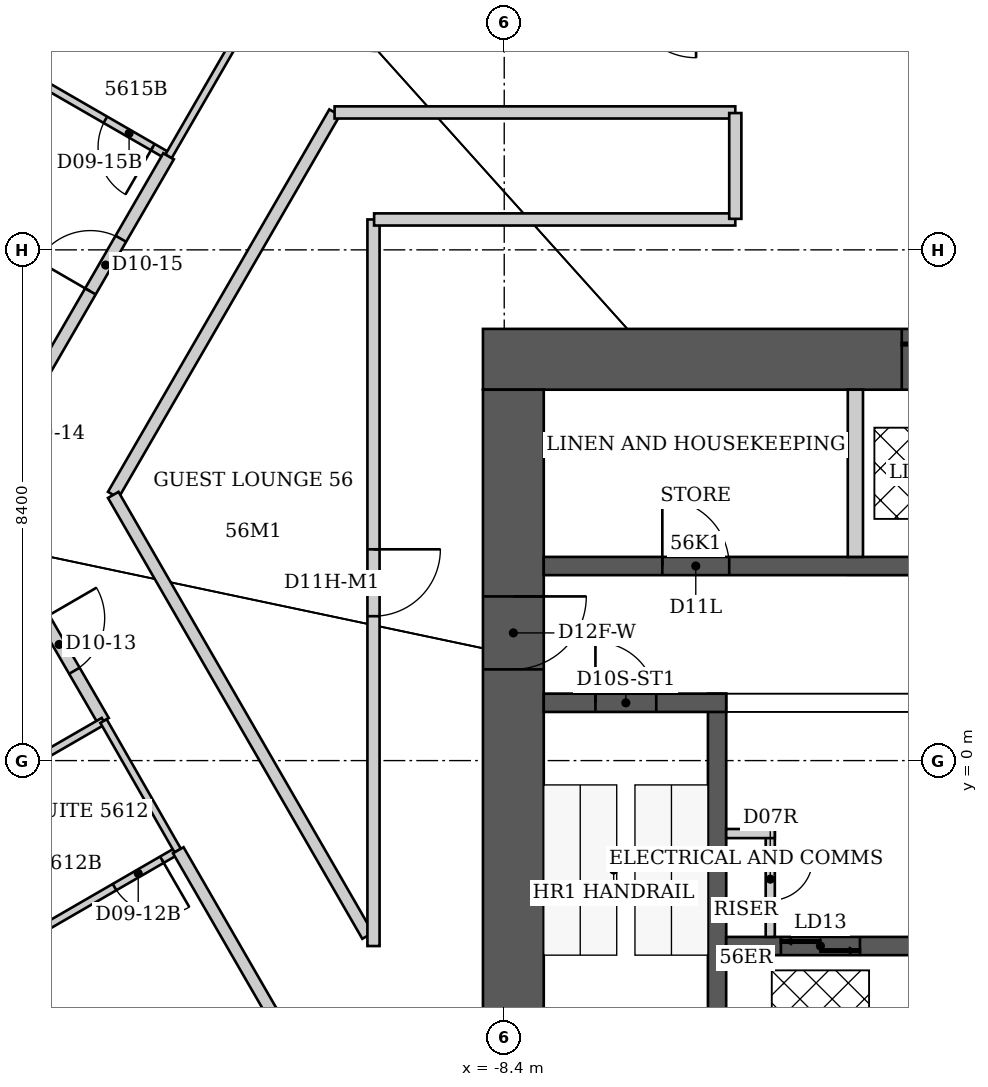
"""IFC4 building model, lengths in metres.
Left out: names, types, materials, properties, quantities, classifications, styles, units other than length and angle.
Written with IfcOpenShell. Run it as: python <this file> out.ifc"""

import sys

from ifc_helpers import new_model, si_unit, direction, frame, frame_2d, origin, place, context, subcontext, project, spatial, rectangle, extrude, element, fill, save


model = new_model("IFC4")
c1 = context("Model", 3, precision=1e-05, world=origin(), true_north=direction((0.0, 1.0)))
c2 = subcontext(c1, "Body", "Model", "MODEL_VIEW")
j1 = project(units=[si_unit("LENGTHUNIT", "METRE"), si_unit("PLANEANGLEUNIT", "RADIAN")], contexts=[c1])
p1 = place(None, origin())
s1 = spatial("IfcSite", under=j1, at=p1, CompositionType="ELEMENT")
p2 = place(p1, origin())
s2 = spatial("IfcBuilding", under=s1, at=p2, CompositionType="ELEMENT")
p3 = place(p2, frame((0.0, 0.0, 225.0)))
s3 = spatial("IfcBuildingStorey", under=s2, at=p3, CompositionType="ELEMENT", Elevation=225.0)
p4 = place(p3, frame((-8.75, 6.6, 0.0), z_axis=(0.0, 0.0, 1.0), x_axis=(1.0, 0.0, 0.0)))
e1 = element("IfcWall", 1, at=p4, inside=s3, PredefinedType="SHEAR", context=c2, shape_type="SweptSolid", body=[
    extrude(rectangle(XDim=17.5, YDim=1.0, at=frame_2d((8.75, 0.0))), origin(), (0.0, 0.0, 1.0), 3.8),
])
p5 = place(p4, frame((6.887, 0.0, 0.0)))
e2 = element("IfcOpeningElement", 2, at=p5, cuts=e1, PredefinedType="OPENING", context=c2, shape_type="SweptSolid", body=[
    extrude(rectangle(XDim=1.1, YDim=2.1, at=frame_2d((0.55, 1.05))), frame((0.0, 0.5, 0.0), z_axis=(0.0, -1.0, 0.0), x_axis=(1.0, 0.0, 0.0)), (0.0, 0.0, 1.0), 1.0),
])
p6 = place(p4, frame((9.512, 0.0, 0.0)))
e3 = element("IfcOpeningElement", 3, at=p6, cuts=e1, PredefinedType="OPENING", context=c2, shape_type="SweptSolid", body=[
    extrude(rectangle(XDim=1.1, YDim=2.1, at=frame_2d((0.55, 1.05))), frame((0.0, 0.5, 0.0), z_axis=(0.0, -1.0, 0.0), x_axis=(1.0, 0.0, 0.0)), (0.0, 0.0, 1.0), 1.0),
])
p7 = place(p4, frame((12.137, 0.0, 0.0)))
e4 = element("IfcOpeningElement", 4, at=p7, cuts=e1, PredefinedType="OPENING", context=c2, shape_type="SweptSolid", body=[
    extrude(rectangle(XDim=1.1, YDim=2.1, at=frame_2d((0.55, 1.05))), frame((0.0, 0.5, 0.0), z_axis=(0.0, -1.0, 0.0), x_axis=(1.0, 0.0, 0.0)), (0.0, 0.0, 1.0), 1.0),
])
p8 = place(p4, frame((14.762, 0.0, 0.0)))
e5 = element("IfcOpeningElement", 5, at=p8, cuts=e1, PredefinedType="OPENING", context=c2, shape_type="SweptSolid", body=[
    extrude(rectangle(XDim=1.1, YDim=2.1, at=frame_2d((0.55, 1.05))), frame((0.0, 0.5, 0.0), z_axis=(0.0, -1.0, 0.0), x_axis=(1.0, 0.0, 0.0)), (0.0, 0.0, 1.0), 1.0),
])
p9 = place(p3, frame((-8.25, -6.1, 0.0), z_axis=(0.0, 0.0, 1.0), x_axis=(0.0, 1.0, 0.0)))
e6 = element("IfcWall", 6, at=p9, inside=s3, PredefinedType="SHEAR", context=c2, shape_type="SweptSolid", body=[
    extrude(rectangle(XDim=12.2, YDim=1.0, at=frame_2d((6.1, 0.0))), origin(), (0.0, 0.0, 1.0), 3.8),
])
p10 = place(p9, frame((7.6, 0.0, 0.0)))
e7 = element("IfcOpeningElement", 7, at=p10, cuts=e6, PredefinedType="OPENING", context=c2, shape_type="SweptSolid", body=[
    extrude(rectangle(XDim=1.2, YDim=2.2, at=frame_2d((0.6, 1.1))), frame((0.0, 0.5, 0.0), z_axis=(0.0, -1.0, 0.0), x_axis=(1.0, 0.0, 0.0)), (0.0, 0.0, 1.0), 1.0),
])
p11 = place(p3, frame((-4.9, -6.1, 0.0), z_axis=(0.0, 0.0, 1.0), x_axis=(0.0, 1.0, 0.0)))
e8 = element("IfcWall", 8, at=p11, inside=s3, PredefinedType="SHEAR", context=c2, shape_type="SweptSolid", body=[
    extrude(rectangle(XDim=7.2, YDim=0.3, at=frame_2d((3.6, 0.0))), origin(), (0.0, 0.0, 1.0), 3.8),
])
p12 = place(p3, frame((-7.75, 0.95, 0.0), z_axis=(0.0, 0.0, 1.0), x_axis=(1.0, 0.0, 0.0)))
e9 = element("IfcWall", 9, at=p12, inside=s3, PredefinedType="SHEAR", context=c2, shape_type="SweptSolid", body=[
    extrude(rectangle(XDim=3.0, YDim=0.3, at=frame_2d((1.5, 0.0))), origin(), (0.0, 0.0, 1.0), 3.8),
])
p13 = place(p12, frame((0.85, 0.0, 0.0)))
e10 = element("IfcOpeningElement", 10, at=p13, cuts=e9, PredefinedType="OPENING", context=c2, shape_type="SweptSolid", body=[
    extrude(rectangle(XDim=1.0, YDim=2.2, at=frame_2d((0.5, 1.1))), frame((0.0, 0.15, 0.0), z_axis=(0.0, -1.0, 0.0), x_axis=(1.0, 0.0, 0.0)), (0.0, 0.0, 1.0), 0.3),
])
p14 = place(p3, frame((-4.75, -3.05, 0.0), z_axis=(0.0, 0.0, 1.0), x_axis=(1.0, 0.0, 0.0)))
e11 = element("IfcWall", 11, at=p14, inside=s3, PredefinedType="SHEAR", context=c2, shape_type="SweptSolid", body=[
    extrude(rectangle(XDim=3.1, YDim=0.3, at=frame_2d((1.55, 0.0))), origin(), (0.0, 0.0, 1.0), 3.8),
])
p15 = place(p14, frame((0.9, 0.0, 0.0)))
e12 = element("IfcOpeningElement", 12, at=p15, cuts=e11, PredefinedType="OPENING", context=c2, shape_type="SweptSolid", body=[
    extrude(rectangle(XDim=1.3, YDim=2.1, at=frame_2d((0.65, 1.05))), frame((0.0, 0.15, 0.0), z_axis=(0.0, -1.0, 0.0), x_axis=(1.0, 0.0, 0.0)), (0.0, 0.0, 1.0), 0.3),
])
p16 = place(p3, frame((-7.75, 3.2, 0.0), z_axis=(0.0, 0.0, 1.0), x_axis=(1.0, 0.0, 0.0)))
e13 = element("IfcWall", 13, at=p16, inside=s3, PredefinedType="SHEAR", context=c2, shape_type="SweptSolid", body=[
    extrude(rectangle(XDim=15.5, YDim=0.3, at=frame_2d((7.75, 0.0))), origin(), (0.0, 0.0, 1.0), 3.8),
])
p17 = place(p16, frame((1.95, 0.0, 0.0)))
e14 = element("IfcOpeningElement", 14, at=p17, cuts=e13, PredefinedType="OPENING", context=c2, shape_type="SweptSolid", body=[
    extrude(rectangle(XDim=1.1, YDim=2.2, at=frame_2d((0.55, 1.1))), frame((0.0, 0.15, 0.0), z_axis=(0.0, -1.0, 0.0), x_axis=(1.0, 0.0, 0.0)), (0.0, 0.0, 1.0), 0.3),
])
p18 = place(p3, frame((-2.625, 3.35, 0.0), z_axis=(0.0, 0.0, 1.0), x_axis=(0.0, 1.0, 0.0)))
e15 = element("IfcWall", 15, at=p18, inside=s3, PredefinedType="PARTITIONING", context=c2, shape_type="SweptSolid", body=[
    extrude(rectangle(XDim=2.75, YDim=0.25, at=frame_2d((1.375, 0.0))), origin(), (0.0, 0.0, 1.0), 3.8),
])
p19 = place(p3, frame((-16.45, 3.17, 0.0), z_axis=(0.0, 0.0, 1.0), x_axis=(0.501293994647, -0.865277025542, 0.0)))
e16 = element("IfcWall", 16, at=p19, inside=s3, PredefinedType="PARTITIONING", context=c2, shape_type="SweptSolid", body=[
    extrude(rectangle(XDim=2.912, YDim=0.2, at=frame_2d((1.456, 0.0))), origin(), (0.0, 0.0, 1.0), 3.64),
])
p20 = place(p19, frame((0.956, 0.0, 0.0)))
e17 = element("IfcOpeningElement", 17, at=p20, cuts=e16, PredefinedType="OPENING", context=c2, shape_type="SweptSolid", body=[
    extrude(rectangle(XDim=1.0, YDim=2.13, at=frame_2d((0.5, 1.065))), frame((0.0, 0.1, 0.0), z_axis=(0.0, -1.0, 0.0), x_axis=(1.0, 0.0, 0.0)), (0.0, 0.0, 1.0), 0.2),
])
p21 = place(p3, frame((-16.19, 11.25, 0.0), z_axis=(0.0, 0.0, 1.0), x_axis=(0.866114241029, -0.499846097802, 0.0)))
e18 = element("IfcWall", 18, at=p21, inside=s3, PredefinedType="PARTITIONING", context=c2, shape_type="SweptSolid", body=[
    extrude(rectangle(XDim=2.621, YDim=0.12, at=frame_2d((1.311, 0.0))), origin(), (0.0, 0.0, 1.0), 3.64),
])
p22 = place(p21, frame((1.421, 0.0, 0.0)))
e19 = element("IfcOpeningElement", 19, at=p22, cuts=e18, PredefinedType="OPENING", context=c2, shape_type="SweptSolid", body=[
    extrude(rectangle(XDim=0.9, YDim=2.03, at=frame_2d((0.45, 1.015))), frame((0.0, 0.06, 0.0), z_axis=(0.0, -1.0, 0.0), x_axis=(1.0, 0.0, 0.0)), (0.0, 0.0, 1.0), 0.12),
])
p23 = place(p3, frame((-16.119, -0.002, 0.0), z_axis=(0.0, 0.0, 1.0), x_axis=(0.865998449813, 0.500046682742, 0.0)))
e20 = element("IfcWall", 20, at=p23, inside=s3, PredefinedType="PARTITIONING", context=c2, shape_type="SweptSolid", body=[
    extrude(rectangle(XDim=1.304, YDim=0.12, at=frame_2d((0.652, 0.0))), origin(), (0.0, 0.0, 1.0), 3.64),
])
p24 = place(p3, frame((-16.07, -2.81, 0.0), z_axis=(0.0, 0.0, 1.0), x_axis=(0.865675724273, 0.500605174168, 0.0)))
e21 = element("IfcWall", 21, at=p24, inside=s3, PredefinedType="PARTITIONING", context=c2, shape_type="SweptSolid", body=[
    extrude(rectangle(XDim=2.657, YDim=0.12, at=frame_2d((1.329, 0.0))), origin(), (0.0, 0.0, 1.0), 3.023),
])
p25 = place(p24, frame((1.457, 0.0, 0.0)))
e22 = element("IfcOpeningElement", 22, at=p25, cuts=e21, PredefinedType="OPENING", context=c2, shape_type="SweptSolid", body=[
    extrude(rectangle(XDim=0.9, YDim=2.03, at=frame_2d((0.45, 1.015))), frame((0.0, 0.06, 0.0), z_axis=(0.0, -1.0, 0.0), x_axis=(1.0, 0.0, 0.0)), (0.0, 0.0, 1.0), 0.12),
])
p26 = place(p3, frame((-15.99, 6.36, 0.0), z_axis=(0.0, 0.0, 1.0), x_axis=(0.500589371231, 0.865684862644, 0.0)))
e23 = element("IfcWall", 23, at=p26, inside=s3, PredefinedType="PARTITIONING", context=c2, shape_type="SweptSolid", body=[
    extrude(rectangle(XDim=4.135, YDim=0.2, at=frame_2d((2.068, 0.0))), origin(), (0.0, 0.0, 1.0), 3.64),
])
p27 = place(p26, frame((1.568, 0.0, 0.0)))
e24 = element("IfcOpeningElement", 24, at=p27, cuts=e23, PredefinedType="OPENING", context=c2, shape_type="SweptSolid", body=[
    extrude(rectangle(XDim=1.0, YDim=2.13, at=frame_2d((0.5, 1.065))), frame((0.0, 0.1, 0.0), z_axis=(0.0, -1.0, 0.0), x_axis=(1.0, 0.0, 0.0)), (0.0, 0.0, 1.0), 0.2),
])
p28 = place(p3, frame((-14.99, 0.65, 0.0), z_axis=(0.0, 0.0, 1.0), x_axis=(0.497027744361, -0.86773464915, 0.0)))
e25 = element("IfcWall", 25, at=p28, inside=s3, PredefinedType="PARTITIONING", context=c2, shape_type="SweptSolid", body=[
    extrude(rectangle(XDim=2.455, YDim=0.12, at=frame_2d((1.227, 0.0))), origin(), (0.0, 0.0, 1.0), 3.64),
])
p29 = place(p3, frame((-14.99, 13.33, 0.0), z_axis=(0.0, 0.0, 1.0), x_axis=(-0.499693115345, -0.866202511239, 0.0)))
e26 = element("IfcWall", 26, at=p29, inside=s3, PredefinedType="PARTITIONING", context=c2, shape_type="SweptSolid", body=[
    extrude(rectangle(XDim=2.401, YDim=0.12, at=frame_2d((1.201, 0.0))), origin(), (0.0, 0.0, 1.0), 3.64),
])
p30 = place(p3, frame((-14.83, 4.37, 0.0), z_axis=(0.0, 0.0, 1.0), x_axis=(0.500899863475, 0.865505243642, 0.0)))
e27 = element("IfcWall", 27, at=p30, inside=s3, PredefinedType="PARTITIONING", context=c2, shape_type="SweptSolid", body=[
    extrude(rectangle(XDim=7.267, YDim=0.2, at=frame_2d((3.634, 0.0))), origin(), (0.0, 0.0, 1.0), 3.64),
])
p31 = place(p3, frame((-13.92, 9.94, 0.0), z_axis=(0.0, 0.0, 1.0), x_axis=(0.500402934999, 0.865792644139, 0.0)))
e28 = element("IfcWall", 28, at=p31, inside=s3, PredefinedType="PARTITIONING", context=c2, shape_type="SweptSolid", body=[
    extrude(rectangle(XDim=2.401, YDim=0.12, at=frame_2d((1.201, 0.0))), origin(), (0.0, 0.0, 1.0), 3.64),
])
p32 = place(p3, frame((-11.19, 10.66, 0.0), z_axis=(0.0, 0.0, 1.0), x_axis=(1.0, 0.0, 0.0)))
e29 = element("IfcWall", 29, at=p32, inside=s3, PredefinedType="PARTITIONING", context=c2, shape_type="SweptSolid", body=[
    extrude(rectangle(XDim=6.59, YDim=0.2, at=frame_2d((3.295, 0.0))), origin(), (0.0, 0.0, 1.0), 3.64),
])
p33 = place(p3, frame((-10.647, -2.881, 0.0), z_axis=(0.0, 0.0, 1.0), x_axis=(-0.499665221769, 0.866218601829, 0.0)))
e30 = element("IfcWall", 30, at=p33, inside=s3, PredefinedType="PARTITIONING", context=c2, shape_type="SweptSolid", body=[
    extrude(rectangle(XDim=8.371, YDim=0.2, at=frame_2d((4.186, 0.0))), origin(), (0.0, 0.0, 1.0), 3.64),
])
p34 = place(p3, frame((-10.55, 8.9, 0.0), z_axis=(0.0, 0.0, 1.0), x_axis=(0.0, -1.0, 0.0)))
e31 = element("IfcWall", 31, at=p34, inside=s3, PredefinedType="PARTITIONING", context=c2, shape_type="SweptSolid", body=[
    extrude(rectangle(XDim=11.95, YDim=0.2, at=frame_2d((5.975, 0.0))), origin(), (0.0, 0.0, 1.0), 3.64),
])
p35 = place(p34, frame((5.425, 0.0, 0.0)))
e32 = element("IfcOpeningElement", 32, at=p35, cuts=e31, PredefinedType="OPENING", context=c2, shape_type="SweptSolid", body=[
    extrude(rectangle(XDim=1.1, YDim=2.2, at=frame_2d((0.55, 1.1))), frame((0.0, 0.1, 0.0), z_axis=(0.0, -1.0, 0.0), x_axis=(1.0, 0.0, 0.0)), (0.0, 0.0, 1.0), 0.2),
])
p36 = place(p3, frame((-9.997, -7.998, 0.0), z_axis=(0.0, 0.0, 1.0), x_axis=(-0.499699067435, 0.866199077582, 0.0)))
e33 = element("IfcWall", 33, at=p36, inside=s3, PredefinedType="PARTITIONING", context=c2, shape_type="SweptSolid", body=[
    extrude(rectangle(XDim=7.531, YDim=0.2, at=frame_2d((3.766, 0.0))), origin(), (0.0, 0.0, 1.0), 3.64),
])
p37 = place(p36, frame((3.266, 0.0, 0.0)))
e34 = element("IfcOpeningElement", 34, at=p37, cuts=e33, PredefinedType="OPENING", context=c2, shape_type="SweptSolid", body=[
    extrude(rectangle(XDim=1.0, YDim=2.13, at=frame_2d((0.5, 1.065))), frame((0.0, 0.1, 0.0), z_axis=(0.0, -1.0, 0.0), x_axis=(1.0, 0.0, 0.0)), (0.0, 0.0, 1.0), 0.2),
])
p38 = place(p3, frame((-4.6, 8.9, 0.0), z_axis=(0.0, 0.0, 1.0), x_axis=(-1.0, 0.0, 0.0)))
e35 = element("IfcWall", 35, at=p38, inside=s3, PredefinedType="PARTITIONING", context=c2, shape_type="SweptSolid", body=[
    extrude(rectangle(XDim=5.94, YDim=0.2, at=frame_2d((2.97, 0.0))), origin(), (0.0, 0.0, 1.0), 3.64),
])
p39 = place(p3, frame((-4.6, 10.65, 0.0), z_axis=(0.0, 0.0, 1.0), x_axis=(0.0, -1.0, 0.0)))
e36 = element("IfcWall", 36, at=p39, inside=s3, PredefinedType="PARTITIONING", context=c2, shape_type="SweptSolid", body=[
    extrude(rectangle(XDim=1.74, YDim=0.2, at=frame_2d((0.87, 0.0))), origin(), (0.0, 0.0, 1.0), 3.64),
])
p40 = place(p3, frame((-4.025, -2.9, 0.0), z_axis=(0.0, 0.0, 1.0), x_axis=(0.0, 1.0, 0.0)))
e37 = element("IfcWall", 37, at=p40, inside=s3, PredefinedType="PARTITIONING", context=c2, shape_type="SweptSolid", body=[
    extrude(rectangle(XDim=1.775, YDim=0.15, at=frame_2d((0.887, 0.0))), origin(), (0.0, 0.0, 1.0), 3.64),
])
p41 = place(p40, frame((0.6, 0.0, 0.0)))
e38 = element("IfcOpeningElement", 38, at=p41, cuts=e37, PredefinedType="OPENING", context=c2, shape_type="SweptSolid", body=[
    extrude(rectangle(XDim=0.7, YDim=2.1, at=frame_2d((0.35, 1.05))), frame((0.0, 0.075, 0.0), z_axis=(0.0, -1.0, 0.0), x_axis=(1.0, 0.0, 0.0)), (0.0, 0.0, 1.0), 0.15),
])
p42 = place(p3, frame((-4.75, -1.2, 0.0), z_axis=(0.0, 0.0, 1.0), x_axis=(1.0, 0.0, 0.0)))
e39 = element("IfcWall", 39, at=p42, inside=s3, PredefinedType="PARTITIONING", context=c2, shape_type="SweptSolid", body=[
    extrude(rectangle(XDim=0.8, YDim=0.15, at=frame_2d((0.4, 0.0))), origin(), (0.0, 0.0, 1.0), 3.64),
])
p43 = place(p25, origin())
e40 = element("IfcDoor", 40, at=p43, inside=s3, OperationType="SINGLE_SWING_RIGHT", PredefinedType="DOOR", context=c2, shape_type="SweptSolid", body=[
    extrude(rectangle(XDim=0.9, YDim=2.03, at=frame_2d((0.45, 1.015))), frame((0.0, 0.025, 0.0), z_axis=(0.0, -1.0, 0.0), x_axis=(1.0, 0.0, 0.0)), (0.0, 0.0, 1.0), 0.05),
])
fill(e22, e40)
p44 = place(p20, origin())
e41 = element("IfcDoor", 41, at=p44, inside=s3, OperationType="SINGLE_SWING_LEFT", PredefinedType="DOOR", context=c2, shape_type="SweptSolid", body=[
    extrude(rectangle(XDim=1.0, YDim=2.13, at=frame_2d((0.5, 1.065))), frame((0.0, 0.025, 0.0), z_axis=(0.0, -1.0, 0.0), x_axis=(1.0, 0.0, 0.0)), (0.0, 0.0, 1.0), 0.05),
])
fill(e17, e41)
p45 = place(p27, origin())
e42 = element("IfcDoor", 42, at=p45, inside=s3, OperationType="SINGLE_SWING_LEFT", PredefinedType="DOOR", context=c2, shape_type="SweptSolid", body=[
    extrude(rectangle(XDim=1.0, YDim=2.13, at=frame_2d((0.5, 1.065))), frame((0.0, 0.025, 0.0), z_axis=(0.0, -1.0, 0.0), x_axis=(1.0, 0.0, 0.0)), (0.0, 0.0, 1.0), 0.05),
])
fill(e24, e42)
p46 = place(p22, origin())
e43 = element("IfcDoor", 43, at=p46, inside=s3, OperationType="SINGLE_SWING_RIGHT", PredefinedType="DOOR", context=c2, shape_type="SweptSolid", body=[
    extrude(rectangle(XDim=0.9, YDim=2.03, at=frame_2d((0.45, 1.015))), frame((0.0, 0.025, 0.0), z_axis=(0.0, -1.0, 0.0), x_axis=(1.0, 0.0, 0.0)), (0.0, 0.0, 1.0), 0.05),
])
fill(e19, e43)
p47 = place(p35, origin())
e44 = element("IfcDoor", 44, at=p47, inside=s3, OperationType="SINGLE_SWING_LEFT", PredefinedType="DOOR", context=c2, shape_type="SweptSolid", body=[
    extrude(rectangle(XDim=1.1, YDim=2.2, at=frame_2d((0.55, 1.1))), frame((0.0, 0.025, 0.0), z_axis=(0.0, -1.0, 0.0), x_axis=(1.0, 0.0, 0.0)), (0.0, 0.0, 1.0), 0.05),
])
fill(e32, e44)
p48 = place(p13, origin())
e45 = element("IfcDoor", 45, at=p48, inside=s3, OperationType="SINGLE_SWING_LEFT", PredefinedType="DOOR", context=c2, shape_type="SweptSolid", body=[
    extrude(rectangle(XDim=1.0, YDim=2.2, at=frame_2d((0.5, 1.1))), frame((0.0, 0.025, 0.0), z_axis=(0.0, -1.0, 0.0), x_axis=(1.0, 0.0, 0.0)), (0.0, 0.0, 1.0), 0.05),
])
fill(e10, e45)
p49 = place(p10, origin())
e46 = element("IfcDoor", 46, at=p49, inside=s3, OperationType="SINGLE_SWING_RIGHT", PredefinedType="DOOR", context=c2, shape_type="SweptSolid", body=[
    extrude(rectangle(XDim=1.2, YDim=2.2, at=frame_2d((0.6, 1.1))), frame((0.0, 0.025, 0.0), z_axis=(0.0, -1.0, 0.0), x_axis=(1.0, 0.0, 0.0)), (0.0, 0.0, 1.0), 0.05),
])
fill(e7, e46)
p50 = place(p41, origin())
e47 = element("IfcDoor", 47, at=p50, inside=s3, OperationType="SINGLE_SWING_RIGHT", PredefinedType="DOOR", context=c2, shape_type="SweptSolid", body=[
    extrude(rectangle(XDim=0.7, YDim=2.1, at=frame_2d((0.35, 1.05))), frame((0.0, 0.025, 0.0), z_axis=(0.0, -1.0, 0.0), x_axis=(1.0, 0.0, 0.0)), (0.0, 0.0, 1.0), 0.05),
])
fill(e38, e47)
p51 = place(p17, origin())
e48 = element("IfcDoor", 48, at=p51, inside=s3, OperationType="SINGLE_SWING_LEFT", PredefinedType="DOOR", context=c2, shape_type="SweptSolid", body=[
    extrude(rectangle(XDim=1.1, YDim=2.2, at=frame_2d((0.55, 1.1))), frame((0.0, 0.025, 0.0), z_axis=(0.0, -1.0, 0.0), x_axis=(1.0, 0.0, 0.0)), (0.0, 0.0, 1.0), 0.05),
])
fill(e14, e48)
p52 = place(p5, origin())
e49 = element("IfcDoor", 49, at=p52, inside=s3, OperationType="DOUBLE_DOOR_SLIDING", PredefinedType="DOOR", context=c2, shape_type="SweptSolid", body=[
    extrude(rectangle(XDim=1.1, YDim=2.1, at=frame_2d((0.55, 1.05))), frame((0.0, 0.025, 0.0), z_axis=(0.0, -1.0, 0.0), x_axis=(1.0, 0.0, 0.0)), (0.0, 0.0, 1.0), 0.05),
])
fill(e2, e49)
p53 = place(p15, origin())
e50 = element("IfcDoor", 50, at=p53, inside=s3, OperationType="DOUBLE_DOOR_SLIDING", PredefinedType="DOOR", context=c2, shape_type="SweptSolid", body=[
    extrude(rectangle(XDim=1.3, YDim=2.1, at=frame_2d((0.65, 1.05))), frame((0.0, 0.025, 0.0), z_axis=(0.0, -1.0, 0.0), x_axis=(1.0, 0.0, 0.0)), (0.0, 0.0, 1.0), 0.05),
])
fill(e12, e50)
save(model, sys.argv[1])
